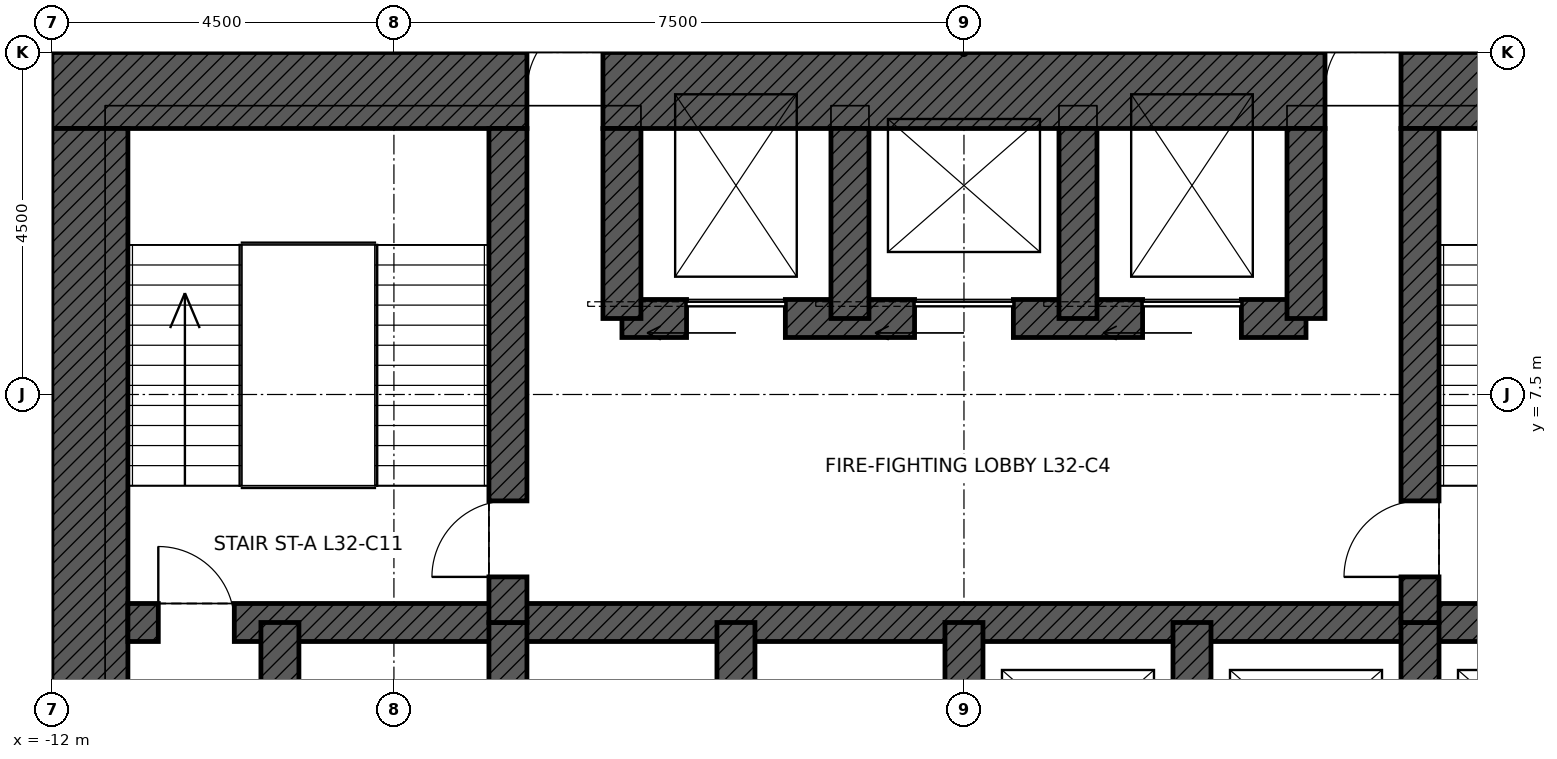
"""IFC4 building model, lengths in metres.
Left out: names, types, materials, properties, quantities, classifications, styles, units other than length and angle.
Written with IfcOpenShell. Run it as: python <this file> out.ifc"""

import sys

from ifc_helpers import new_model, si_unit, direction, frame, frame_2d, origin, place, context, subcontext, project, spatial, rectangle, extrude, element, fill, save


model = new_model("IFC4")
c1 = context("Model", 3, precision=1e-05, world=origin(), true_north=direction((0.0, 1.0)))
c2 = subcontext(c1, "Body", "Model", "MODEL_VIEW")
j1 = project(units=[si_unit("LENGTHUNIT", "METRE"), si_unit("PLANEANGLEUNIT", "RADIAN")], contexts=[c1])
p1 = place(None, origin())
s1 = spatial("IfcSite", under=j1, at=p1, CompositionType="ELEMENT")
p2 = place(p1, origin())
s2 = spatial("IfcBuilding", under=s1, at=p2, CompositionType="ELEMENT")
p3 = place(p2, frame((0.0, 0.0, 158.4)))
s3 = spatial("IfcBuildingStorey", under=s2, at=p3, CompositionType="ELEMENT", Elevation=158.4)
p4 = place(p3, frame((-12.0, 11.5, 0.0), z_axis=(0.0, 0.0, 1.0), x_axis=(1.0, 0.0, 0.0)))
e1 = element("IfcWall", 1, at=p4, inside=s3, PredefinedType="SHEAR", context=c2, shape_type="SweptSolid", body=[
    extrude(rectangle(XDim=24.0, YDim=1.0, at=frame_2d((12.0, 0.0))), origin(), (0.0, 0.0, 1.0), 4.5),
])
p5 = place(p4, frame((6.25, 0.0, 0.0)))
e2 = element("IfcOpeningElement", 2, at=p5, cuts=e1, PredefinedType="OPENING", context=c2, shape_type="SweptSolid", body=[
    extrude(rectangle(XDim=1.0, YDim=2.4, at=frame_2d((0.5, 1.2))), frame((0.0, 0.51, 0.0), z_axis=(0.0, -1.0, 0.0), x_axis=(1.0, 0.0, 0.0)), (0.0, 0.0, 1.0), 1.02),
])
p6 = place(p4, frame((16.75, 0.0, 0.0)))
e3 = element("IfcOpeningElement", 3, at=p6, cuts=e1, PredefinedType="OPENING", context=c2, shape_type="SweptSolid", body=[
    extrude(rectangle(XDim=1.0, YDim=2.4, at=frame_2d((0.5, 1.2))), frame((0.0, 0.51, 0.0), z_axis=(0.0, -1.0, 0.0), x_axis=(1.0, 0.0, 0.0)), (0.0, 0.0, 1.0), 1.02),
])
p7 = place(p3, frame((-11.5, -11.0, 0.0), z_axis=(0.0, 0.0, 1.0), x_axis=(0.0, 1.0, 0.0)))
e4 = element("IfcWall", 4, at=p7, inside=s3, PredefinedType="SHEAR", context=c2, shape_type="SweptSolid", body=[
    extrude(rectangle(XDim=22.0, YDim=1.0, at=frame_2d((11.0, 0.0))), origin(), (0.0, 0.0, 1.0), 4.5),
])
p8 = place(p7, frame((10.5, 0.0, 0.0)))
e5 = element("IfcOpeningElement", 5, at=p8, cuts=e4, PredefinedType="OPENING", context=c2, shape_type="SweptSolid", body=[
    extrude(rectangle(XDim=1.0, YDim=2.4, at=frame_2d((0.5, 1.2))), frame((0.0, 0.51, 0.0), z_axis=(0.0, -1.0, 0.0), x_axis=(1.0, 0.0, 0.0)), (0.0, 0.0, 1.0), 1.02),
])
p9 = place(p3, frame((-11.0, 4.5, 0.0), z_axis=(0.0, 0.0, 1.0), x_axis=(1.0, 0.0, 0.0)))
e6 = element("IfcWall", 6, at=p9, inside=s3, PredefinedType="SHEAR", context=c2, shape_type="SweptSolid", body=[
    extrude(rectangle(XDim=22.0, YDim=0.5, at=frame_2d((11.0, 0.0))), origin(), (0.0, 0.0, 1.0), 4.5),
])
p10 = place(p9, frame((0.4, 0.0, 0.0)))
e7 = element("IfcOpeningElement", 7, at=p10, cuts=e6, PredefinedType="OPENING", context=c2, shape_type="SweptSolid", body=[
    extrude(rectangle(XDim=1.0, YDim=2.1, at=frame_2d((0.5, 1.05))), frame((0.0, 0.26, 0.0), z_axis=(0.0, -1.0, 0.0), x_axis=(1.0, 0.0, 0.0)), (0.0, 0.0, 1.0), 0.52),
])
p11 = place(p9, frame((20.6, 0.0, 0.0)))
e8 = element("IfcOpeningElement", 8, at=p11, cuts=e6, PredefinedType="OPENING", context=c2, shape_type="SweptSolid", body=[
    extrude(rectangle(XDim=1.0, YDim=2.1, at=frame_2d((0.5, 1.05))), frame((0.0, 0.26, 0.0), z_axis=(0.0, -1.0, 0.0), x_axis=(1.0, 0.0, 0.0)), (0.0, 0.0, 1.0), 0.52),
])
p12 = place(p3, frame((-4.5, 8.5, 0.0), z_axis=(0.0, 0.0, 1.0), x_axis=(1.0, 0.0, 0.0)))
e9 = element("IfcWall", 9, at=p12, inside=s3, PredefinedType="SHEAR", context=c2, shape_type="SweptSolid", body=[
    extrude(rectangle(XDim=9.0, YDim=0.5, at=frame_2d((4.5, 0.0))), origin(), (0.0, 0.0, 1.0), 4.5),
])
p13 = place(p12, frame((0.85, 0.0, 0.0)))
e10 = element("IfcOpeningElement", 10, at=p13, cuts=e9, PredefinedType="OPENING", context=c2, shape_type="SweptSolid", body=[
    extrude(rectangle(XDim=1.3, YDim=2.4, at=frame_2d((0.65, 1.2))), frame((0.0, 0.26, 0.0), z_axis=(0.0, -1.0, 0.0), x_axis=(1.0, 0.0, 0.0)), (0.0, 0.0, 1.0), 0.52),
])
p14 = place(p12, frame((6.85, 0.0, 0.0)))
e11 = element("IfcOpeningElement", 11, at=p14, cuts=e9, PredefinedType="OPENING", context=c2, shape_type="SweptSolid", body=[
    extrude(rectangle(XDim=1.3, YDim=2.4, at=frame_2d((0.65, 1.2))), frame((0.0, 0.26, 0.0), z_axis=(0.0, -1.0, 0.0), x_axis=(1.0, 0.0, 0.0)), (0.0, 0.0, 1.0), 0.52),
])
p15 = place(p12, frame((3.85, 0.0, 0.0)))
e12 = element("IfcOpeningElement", 12, at=p15, cuts=e9, PredefinedType="OPENING", context=c2, shape_type="SweptSolid", body=[
    extrude(rectangle(XDim=1.3, YDim=2.4, at=frame_2d((0.65, 1.2))), frame((0.0, 0.26, 0.0), z_axis=(0.0, -1.0, 0.0), x_axis=(1.0, 0.0, 0.0)), (0.0, 0.0, 1.0), 0.52),
])
for number, where, z_axis, x_axis in (
    (13, (-9.0, 1.5, 0.0), (0.0, 0.0, 1.0), (0.0, 1.0, 0.0)),
    (14, (-6.0, 1.5, 0.0), (0.0, 0.0, 1.0), (0.0, 1.0, 0.0)),
    (15, (-3.0, 1.5, 0.0), (0.0, 0.0, 1.0), (0.0, 1.0, 0.0)),
    (16, (0.0, 1.5, 0.0), (0.0, 0.0, 1.0), (0.0, 1.0, 0.0)),
    (17, (3.0, 1.5, 0.0), (0.0, 0.0, 1.0), (0.0, 1.0, 0.0)),
    (18, (6.0, 1.5, 0.0), (0.0, 0.0, 1.0), (0.0, 1.0, 0.0)),
):
    element("IfcWall", number, at=place(p3, frame(where, z_axis=z_axis, x_axis=x_axis)), inside=s3, PredefinedType="SHEAR", context=c2, shape_type="SweptSolid", body=[
        extrude(rectangle(XDim=3.0, YDim=0.5, at=frame_2d((1.5, 0.0))), origin(), (0.0, 0.0, 1.0), 4.5),
    ])
p16 = place(p3, frame((-6.0, 4.5, 0.0), z_axis=(0.0, 0.0, 1.0), x_axis=(0.0, 1.0, 0.0)))
e19 = element("IfcWall", 19, at=p16, inside=s3, PredefinedType="SHEAR", context=c2, shape_type="SweptSolid", body=[
    extrude(rectangle(XDim=6.5, YDim=0.5, at=frame_2d((3.25, 0.0))), origin(), (0.0, 0.0, 1.0), 4.5),
])
p17 = place(p16, frame((0.6, 0.0, 0.0)))
e20 = element("IfcOpeningElement", 20, at=p17, cuts=e19, PredefinedType="OPENING", context=c2, shape_type="SweptSolid", body=[
    extrude(rectangle(XDim=1.0, YDim=2.1, at=frame_2d((0.5, 1.05))), frame((0.0, 0.26, 0.0), z_axis=(0.0, -1.0, 0.0), x_axis=(1.0, 0.0, 0.0)), (0.0, 0.0, 1.0), 0.52),
])
p18 = place(p3, frame((6.0, 4.5, 0.0), z_axis=(0.0, 0.0, 1.0), x_axis=(0.0, 1.0, 0.0)))
e21 = element("IfcWall", 21, at=p18, inside=s3, PredefinedType="SHEAR", context=c2, shape_type="SweptSolid", body=[
    extrude(rectangle(XDim=6.5, YDim=0.5, at=frame_2d((3.25, 0.0))), origin(), (0.0, 0.0, 1.0), 4.5),
])
p19 = place(p18, frame((0.6, 0.0, 0.0)))
e22 = element("IfcOpeningElement", 22, at=p19, cuts=e21, PredefinedType="OPENING", context=c2, shape_type="SweptSolid", body=[
    extrude(rectangle(XDim=1.0, YDim=2.1, at=frame_2d((0.5, 1.05))), frame((0.0, 0.26, 0.0), z_axis=(0.0, -1.0, 0.0), x_axis=(1.0, 0.0, 0.0)), (0.0, 0.0, 1.0), 0.52),
])
for number, where, z_axis, x_axis in (
    (23, (-4.5, 8.5, 0.0), (0.0, 0.0, 1.0), (0.0, 1.0, 0.0)),
    (24, (4.5, 8.5, 0.0), (0.0, 0.0, 1.0), (0.0, 1.0, 0.0)),
    (25, (-1.5, 8.5, 0.0), (0.0, 0.0, 1.0), (0.0, 1.0, 0.0)),
    (26, (1.5, 8.5, 0.0), (0.0, 0.0, 1.0), (0.0, 1.0, 0.0)),
):
    element("IfcWall", number, at=place(p3, frame(where, z_axis=z_axis, x_axis=x_axis)), inside=s3, PredefinedType="SHEAR", context=c2, shape_type="SweptSolid", body=[
        extrude(rectangle(XDim=2.5, YDim=0.5, at=frame_2d((1.25, 0.0))), origin(), (0.0, 0.0, 1.0), 4.5),
    ])
p20 = place(p10, origin())
e27 = element("IfcDoor", 27, at=p20, inside=s3, OperationType="SINGLE_SWING_LEFT", PredefinedType="DOOR", context=c2, shape_type="SweptSolid", body=[
    extrude(rectangle(XDim=1.0, YDim=2.1, at=frame_2d((0.5, 1.05))), frame((0.0, 0.025, 0.0), z_axis=(0.0, -1.0, 0.0), x_axis=(1.0, 0.0, 0.0)), (0.0, 0.0, 1.0), 0.05),
])
fill(e7, e27)
p21 = place(p17, origin())
e28 = element("IfcDoor", 28, at=p21, inside=s3, OperationType="SINGLE_SWING_LEFT", PredefinedType="DOOR", context=c2, shape_type="SweptSolid", body=[
    extrude(rectangle(XDim=1.0, YDim=2.1, at=frame_2d((0.5, 1.05))), frame((0.0, 0.025, 0.0), z_axis=(0.0, -1.0, 0.0), x_axis=(1.0, 0.0, 0.0)), (0.0, 0.0, 1.0), 0.05),
])
fill(e20, e28)
p22 = place(p19, origin())
e29 = element("IfcDoor", 29, at=p22, inside=s3, OperationType="SINGLE_SWING_LEFT", PredefinedType="DOOR", context=c2, shape_type="SweptSolid", body=[
    extrude(rectangle(XDim=1.0, YDim=2.1, at=frame_2d((0.5, 1.05))), frame((0.0, 0.025, 0.0), z_axis=(0.0, -1.0, 0.0), x_axis=(1.0, 0.0, 0.0)), (0.0, 0.0, 1.0), 0.05),
])
fill(e22, e29)
p23 = place(p5, origin())
e30 = element("IfcDoor", 30, at=p23, inside=s3, OperationType="SINGLE_SWING_RIGHT", PredefinedType="DOOR", context=c2, shape_type="SweptSolid", body=[
    extrude(rectangle(XDim=1.0, YDim=2.4, at=frame_2d((0.5, 1.2))), frame((0.0, 0.485, 0.0), z_axis=(0.0, -1.0, 0.0), x_axis=(1.0, 0.0, 0.0)), (0.0, 0.0, 1.0), 0.05),
])
fill(e2, e30)
p24 = place(p6, origin())
e31 = element("IfcDoor", 31, at=p24, inside=s3, OperationType="SINGLE_SWING_RIGHT", PredefinedType="DOOR", context=c2, shape_type="SweptSolid", body=[
    extrude(rectangle(XDim=1.0, YDim=2.4, at=frame_2d((0.5, 1.2))), frame((0.0, 0.485, 0.0), z_axis=(0.0, -1.0, 0.0), x_axis=(1.0, 0.0, 0.0)), (0.0, 0.0, 1.0), 0.05),
])
fill(e3, e31)
p25 = place(p13, origin())
e32 = element("IfcDoor", 32, at=p25, inside=s3, OperationType="SLIDING_TO_LEFT", PredefinedType="DOOR", context=c2, shape_type="SweptSolid", body=[
    extrude(rectangle(XDim=1.3, YDim=2.4, at=frame_2d((0.65, 1.2))), frame((0.0, 0.025, 0.0), z_axis=(0.0, -1.0, 0.0), x_axis=(1.0, 0.0, 0.0)), (0.0, 0.0, 1.0), 0.05),
])
fill(e10, e32)
p26 = place(p14, origin())
e33 = element("IfcDoor", 33, at=p26, inside=s3, OperationType="SLIDING_TO_LEFT", PredefinedType="DOOR", context=c2, shape_type="SweptSolid", body=[
    extrude(rectangle(XDim=1.3, YDim=2.4, at=frame_2d((0.65, 1.2))), frame((0.0, 0.025, 0.0), z_axis=(0.0, -1.0, 0.0), x_axis=(1.0, 0.0, 0.0)), (0.0, 0.0, 1.0), 0.05),
])
fill(e11, e33)
p27 = place(p15, origin())
e34 = element("IfcDoor", 34, at=p27, inside=s3, OperationType="SLIDING_TO_LEFT", PredefinedType="DOOR", context=c2, shape_type="SweptSolid", body=[
    extrude(rectangle(XDim=1.3, YDim=2.4, at=frame_2d((0.65, 1.2))), frame((0.0, 0.025, 0.0), z_axis=(0.0, -1.0, 0.0), x_axis=(1.0, 0.0, 0.0)), (0.0, 0.0, 1.0), 0.05),
])
fill(e12, e34)
save(model, sys.argv[1])
